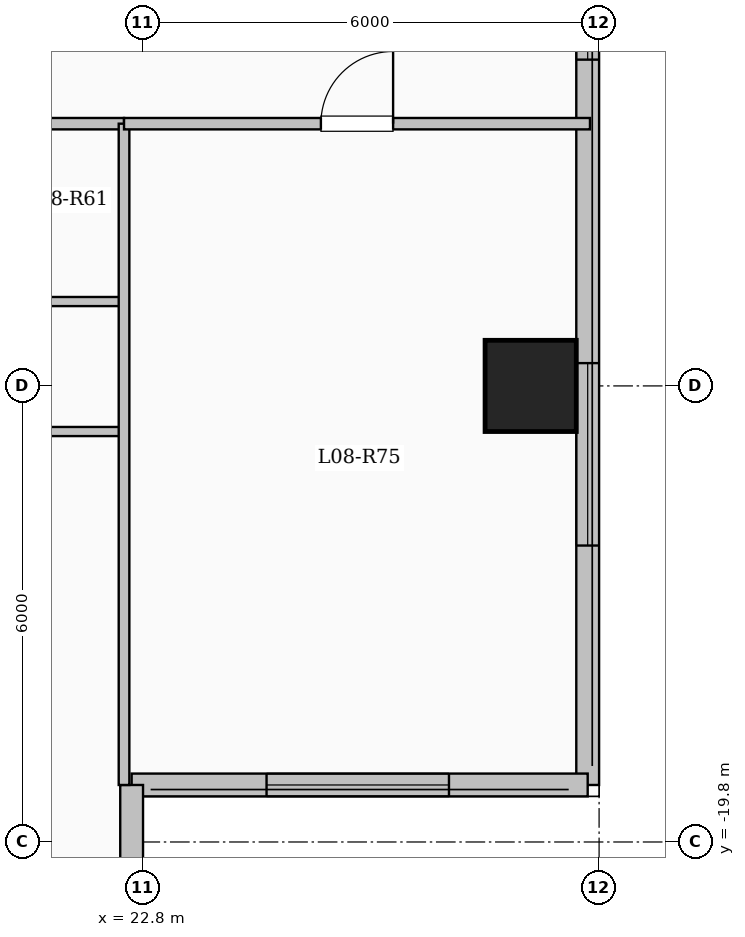
"""IFC4 building model, lengths in metres.
Left out: names, types, materials, properties, quantities, classifications, styles, units other than length and angle.
Written with IfcOpenShell. Run it as: python <this file> out.ifc"""

import sys

from ifc_helpers import new_model, si_unit, direction, frame, frame_2d, origin, origin_2d, place, context, subcontext, project, spatial, rectangle, extrude, element, fill, save


model = new_model("IFC4")
c1 = context("Model", 3, precision=1e-05, world=origin(), true_north=direction((0.0, 1.0)))
c2 = subcontext(c1, "Body", "Model", "MODEL_VIEW")
j1 = project(units=[si_unit("LENGTHUNIT", "METRE"), si_unit("PLANEANGLEUNIT", "RADIAN")], contexts=[c1])
p1 = place(None, origin())
s1 = spatial("IfcSite", under=j1, at=p1, CompositionType="ELEMENT")
p2 = place(p1, origin())
s2 = spatial("IfcBuilding", under=s1, at=p2, CompositionType="ELEMENT")
p3 = place(p2, frame((0.0, 0.0, 34.05)))
s3 = spatial("IfcBuildingStorey", under=s2, at=p3, CompositionType="ELEMENT", Elevation=34.05)
p4 = place(p3, frame((27.9, -13.8, 0.0), z_axis=(0.0, 0.0, 1.0), x_axis=(1.0, 0.0, 0.0)))
e1 = element("IfcColumn", 1, at=p4, inside=s3, PredefinedType="COLUMN", context=c2, shape_type="SweptSolid", body=[
    extrude(rectangle(XDim=1.2, YDim=1.2, at=origin_2d()), origin(), (0.0, 0.0, 1.0), 3.35),
])
p5 = place(p3, frame((28.65, 19.05, 0.0), z_axis=(0.0, 0.0, 1.0), x_axis=(0.0, -1.0, 0.0)))
e2 = element("IfcWall", 2, at=p5, inside=s3, PredefinedType="SOLIDWALL", context=c2, shape_type="SweptSolid", body=[
    extrude(rectangle(XDim=38.1, YDim=0.3, at=frame_2d((19.05, 0.0))), origin(), (0.0, 0.0, 1.0), 3.1),
])
p6 = place(p5, frame((2.275, 0.0, 0.9)))
e3 = element("IfcOpeningElement", 3, at=p6, cuts=e2, PredefinedType="OPENING", context=c2, shape_type="SweptSolid", body=[
    extrude(rectangle(XDim=2.0, YDim=1.7, at=frame_2d((1.0, 0.85))), frame((0.0, 0.16, 0.0), z_axis=(0.0, -1.0, 0.0), x_axis=(1.0, 0.0, 0.0)), (0.0, 0.0, 1.0), 0.32),
])
p7 = place(p5, frame((6.925, 0.0, 0.95)))
e4 = element("IfcOpeningElement", 4, at=p7, cuts=e2, PredefinedType="OPENING", context=c2, shape_type="SweptSolid", body=[
    extrude(rectangle(XDim=1.0, YDim=1.5, at=frame_2d((0.5, 0.75))), frame((0.0, 0.16, 0.0), z_axis=(0.0, -1.0, 0.0), x_axis=(1.0, 0.0, 0.0)), (0.0, 0.0, 1.0), 0.32),
])
p8 = place(p5, frame((16.3, 0.0, 0.9)))
e5 = element("IfcOpeningElement", 5, at=p8, cuts=e2, PredefinedType="OPENING", context=c2, shape_type="SweptSolid", body=[
    extrude(rectangle(XDim=2.0, YDim=1.7, at=frame_2d((1.0, 0.85))), frame((0.0, 0.16, 0.0), z_axis=(0.0, -1.0, 0.0), x_axis=(1.0, 0.0, 0.0)), (0.0, 0.0, 1.0), 0.32),
])
p9 = place(p5, frame((27.058, 0.0, 0.9)))
e6 = element("IfcOpeningElement", 6, at=p9, cuts=e2, PredefinedType="OPENING", context=c2, shape_type="SweptSolid", body=[
    extrude(rectangle(XDim=1.5, YDim=1.65, at=frame_2d((0.75, 0.825))), frame((0.0, 0.16, 0.0), z_axis=(0.0, -1.0, 0.0), x_axis=(1.0, 0.0, 0.0)), (0.0, 0.0, 1.0), 0.32),
])
p10 = place(p5, frame((32.55, 0.0, 0.9)))
e7 = element("IfcOpeningElement", 7, at=p10, cuts=e2, PredefinedType="OPENING", context=c2, shape_type="SweptSolid", body=[
    extrude(rectangle(XDim=2.4, YDim=1.8, at=frame_2d((1.2, 0.9))), frame((0.0, 0.16, 0.0), z_axis=(0.0, -1.0, 0.0), x_axis=(1.0, 0.0, 0.0)), (0.0, 0.0, 1.0), 0.32),
])
p11 = place(p3, frame((28.65, -19.05, 0.0), z_axis=(0.0, 0.0, 1.0), x_axis=(-1.0, 0.0, 0.0)))
e8 = element("IfcWall", 8, at=p11, inside=s3, PredefinedType="SOLIDWALL", context=c2, shape_type="SweptSolid", body=[
    extrude(rectangle(XDim=6.0, YDim=0.3, at=frame_2d((3.0, 0.0))), origin(), (0.0, 0.0, 1.0), 3.1),
])
p12 = place(p11, frame((1.825, 0.0, 0.9)))
e9 = element("IfcOpeningElement", 9, at=p12, cuts=e8, PredefinedType="OPENING", context=c2, shape_type="SweptSolid", body=[
    extrude(rectangle(XDim=2.4, YDim=1.8, at=frame_2d((1.2, 0.9))), frame((0.0, 0.16, 0.0), z_axis=(0.0, -1.0, 0.0), x_axis=(1.0, 0.0, 0.0)), (0.0, 0.0, 1.0), 0.32),
])
p13 = place(p3, frame((22.65, -19.05, 0.0), z_axis=(0.0, 0.0, 1.0), x_axis=(0.0, -1.0, 0.0)))
e10 = element("IfcWall", 10, at=p13, inside=s3, PredefinedType="SOLIDWALL", context=c2, shape_type="SweptSolid", body=[
    extrude(rectangle(XDim=4.5, YDim=0.3, at=frame_2d((2.25, 0.0))), origin(), (0.0, 0.0, 1.0), 3.1),
])
p14 = place(p13, frame((1.333, 0.0, 0.9)))
e11 = element("IfcOpeningElement", 11, at=p14, cuts=e10, PredefinedType="OPENING", context=c2, shape_type="SweptSolid", body=[
    extrude(rectangle(XDim=1.8, YDim=1.65, at=frame_2d((0.9, 0.825))), frame((0.0, 0.16, 0.0), z_axis=(0.0, -1.0, 0.0), x_axis=(1.0, 0.0, 0.0)), (0.0, 0.0, 1.0), 0.32),
])
p15 = place(p3, frame((8.55, -10.35, 0.0), z_axis=(0.0, 0.0, 1.0), x_axis=(1.0, 0.0, 0.0)))
e12 = element("IfcWall", 12, at=p15, inside=s3, PredefinedType="PARTITIONING", context=c2, shape_type="SweptSolid", body=[
    extrude(rectangle(XDim=14.0, YDim=0.15, at=frame_2d((7.0, 0.0))), origin(), (0.0, 0.0, 1.0), 3.1),
])
p16 = place(p15, frame((0.75, 0.0, 0.0)))
e13 = element("IfcOpeningElement", 13, at=p16, cuts=e12, PredefinedType="OPENING", context=c2, shape_type="SweptSolid", body=[
    extrude(rectangle(XDim=0.96, YDim=2.15, at=frame_2d((0.48, 1.075))), frame((0.0, 0.085, 0.0), z_axis=(0.0, -1.0, 0.0), x_axis=(1.0, 0.0, 0.0)), (0.0, 0.0, 1.0), 0.17),
])
p17 = place(p3, frame((18.2, -12.69, 0.0), z_axis=(0.0, 0.0, 1.0), x_axis=(1.0, 0.0, 0.0)))
e14 = element("IfcWall", 14, at=p17, inside=s3, PredefinedType="PARTITIONING", context=c2, shape_type="SweptSolid", body=[
    extrude(rectangle(XDim=4.35, YDim=0.12, at=frame_2d((2.175, 0.0))), origin(), (0.0, 0.0, 1.0), 3.1),
])
p18 = place(p17, frame((1.735, 0.0, 0.0)))
e15 = element("IfcOpeningElement", 15, at=p18, cuts=e14, PredefinedType="OPENING", context=c2, shape_type="SweptSolid", body=[
    extrude(rectangle(XDim=0.88, YDim=2.1, at=frame_2d((0.44, 1.05))), frame((0.0, 0.07, 0.0), z_axis=(0.0, -1.0, 0.0), x_axis=(1.0, 0.0, 0.0)), (0.0, 0.0, 1.0), 0.14),
])
p19 = place(p3, frame((13.302, -14.4, 0.0), z_axis=(0.0, 0.0, 1.0), x_axis=(1.0, 0.0, 0.0)))
e16 = element("IfcWall", 16, at=p19, inside=s3, PredefinedType="PARTITIONING", context=c2, shape_type="SweptSolid", body=[
    extrude(rectangle(XDim=9.308, YDim=0.12, at=frame_2d((4.654, 0.0))), origin(), (0.0, 0.0, 1.0), 3.1),
])
p20 = place(p19, frame((1.081, 0.0, 0.0)))
e17 = element("IfcOpeningElement", 17, at=p20, cuts=e16, PredefinedType="OPENING", context=c2, shape_type="SweptSolid", body=[
    extrude(rectangle(XDim=0.88, YDim=2.1, at=frame_2d((0.44, 1.05))), frame((0.0, 0.07, 0.0), z_axis=(0.0, -1.0, 0.0), x_axis=(1.0, 0.0, 0.0)), (0.0, 0.0, 1.0), 0.14),
])
p21 = place(p19, frame((4.124, 0.0, 0.0)))
e18 = element("IfcOpeningElement", 18, at=p21, cuts=e16, PredefinedType="OPENING", context=c2, shape_type="SweptSolid", body=[
    extrude(rectangle(XDim=0.88, YDim=2.1, at=frame_2d((0.44, 1.05))), frame((0.0, 0.07, 0.0), z_axis=(0.0, -1.0, 0.0), x_axis=(1.0, 0.0, 0.0)), (0.0, 0.0, 1.0), 0.14),
])
p22 = place(p19, frame((7.167, 0.0, 0.0)))
e19 = element("IfcOpeningElement", 19, at=p22, cuts=e16, PredefinedType="OPENING", context=c2, shape_type="SweptSolid", body=[
    extrude(rectangle(XDim=0.88, YDim=2.1, at=frame_2d((0.44, 1.05))), frame((0.0, 0.07, 0.0), z_axis=(0.0, -1.0, 0.0), x_axis=(1.0, 0.0, 0.0)), (0.0, 0.0, 1.0), 0.14),
])
p23 = place(p3, frame((22.55, -19.05, 0.0), z_axis=(0.0, 0.0, 1.0), x_axis=(0.0, 1.0, 0.0)))
e20 = element("IfcWall", 20, at=p23, inside=s3, PredefinedType="PARTITIONING", context=c2, shape_type="SweptSolid", body=[
    extrude(rectangle(XDim=8.7, YDim=0.14, at=frame_2d((4.35, 0.0))), origin(), (0.0, 0.0, 1.0), 3.1),
])
p24 = place(p3, frame((22.55, -10.35, 0.0), z_axis=(0.0, 0.0, 1.0), x_axis=(1.0, 0.0, 0.0)))
e21 = element("IfcWall", 21, at=p24, inside=s3, PredefinedType="PARTITIONING", context=c2, shape_type="SweptSolid", body=[
    extrude(rectangle(XDim=6.13, YDim=0.15, at=frame_2d((3.065, 0.0))), origin(), (0.0, 0.0, 1.0), 3.1),
])
p25 = place(p24, frame((2.59, 0.0, 0.0)))
e22 = element("IfcOpeningElement", 22, at=p25, cuts=e21, PredefinedType="OPENING", context=c2, shape_type="SweptSolid", body=[
    extrude(rectangle(XDim=0.95, YDim=2.15, at=frame_2d((0.475, 1.075))), frame((0.0, 0.085, 0.0), z_axis=(0.0, -1.0, 0.0), x_axis=(1.0, 0.0, 0.0)), (0.0, 0.0, 1.0), 0.17),
])
p26 = place(p9, origin())
e23 = element("IfcWindow", 23, at=p26, inside=s3, PartitioningType="SINGLE_PANEL", PredefinedType="WINDOW", context=c2, shape_type="SweptSolid", body=[
    extrude(rectangle(XDim=1.5, YDim=1.65, at=frame_2d((0.75, 0.825))), frame((0.0, 0.03, 0.0), z_axis=(0.0, -1.0, 0.0), x_axis=(1.0, 0.0, 0.0)), (0.0, 0.0, 1.0), 0.06),
])
fill(e6, e23)
p27 = place(p10, origin())
e24 = element("IfcWindow", 24, at=p27, inside=s3, PartitioningType="SINGLE_PANEL", PredefinedType="WINDOW", context=c2, shape_type="SweptSolid", body=[
    extrude(rectangle(XDim=2.4, YDim=1.8, at=frame_2d((1.2, 0.9))), frame((0.0, 0.03, 0.0), z_axis=(0.0, -1.0, 0.0), x_axis=(1.0, 0.0, 0.0)), (0.0, 0.0, 1.0), 0.06),
])
fill(e7, e24)
p28 = place(p12, origin())
e25 = element("IfcWindow", 25, at=p28, inside=s3, PartitioningType="SINGLE_PANEL", PredefinedType="WINDOW", context=c2, shape_type="SweptSolid", body=[
    extrude(rectangle(XDim=2.4, YDim=1.8, at=frame_2d((1.2, 0.9))), frame((0.0, 0.03, 0.0), z_axis=(0.0, -1.0, 0.0), x_axis=(1.0, 0.0, 0.0)), (0.0, 0.0, 1.0), 0.06),
])
fill(e9, e25)
p29 = place(p25, origin())
e26 = element("IfcDoor", 26, at=p29, inside=s3, OperationType="SINGLE_SWING_RIGHT", PredefinedType="DOOR", context=c2, shape_type="SweptSolid", body=[
    extrude(rectangle(XDim=0.95, YDim=2.15, at=frame_2d((0.475, 1.075))), frame((0.0, 0.025, 0.0), z_axis=(0.0, -1.0, 0.0), x_axis=(1.0, 0.0, 0.0)), (0.0, 0.0, 1.0), 0.05),
])
fill(e22, e26)
save(model, sys.argv[1])
